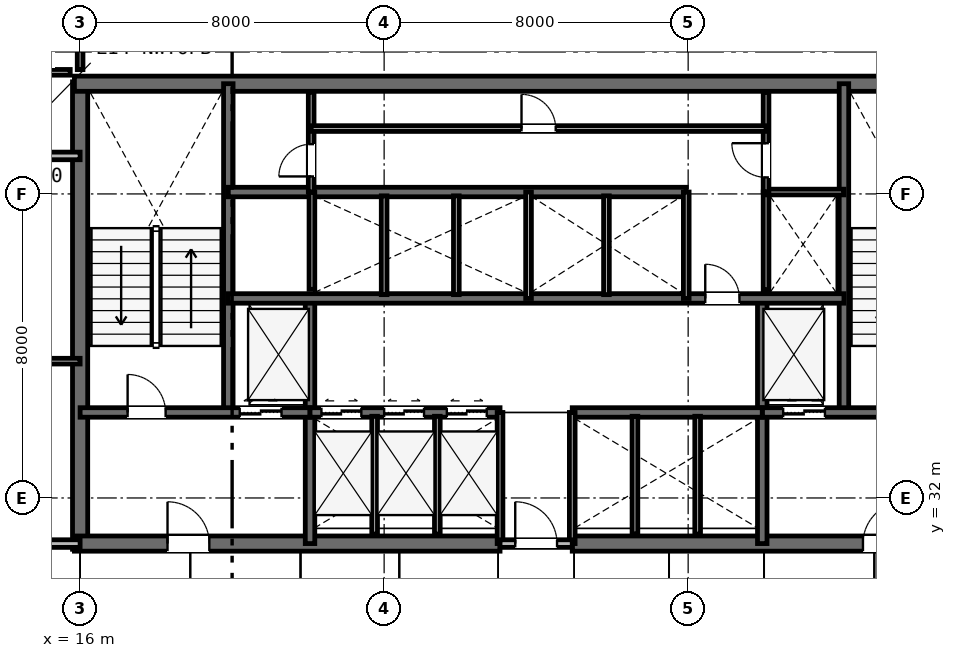
"""IFC4 building model, lengths in metres.
Left out: names, types, materials, properties, quantities, classifications, styles, units other than length and angle.
Written with IfcOpenShell. Run it as: python <this file> out.ifc"""

import sys

from ifc_helpers import new_model, si_unit, direction, frame, frame_2d, origin, place, context, subcontext, project, spatial, rectangle, extrude, element, fill, save


model = new_model("IFC4")
c1 = context("Model", 3, precision=1e-05, world=origin(), true_north=direction((0.0, 1.0)))
c2 = subcontext(c1, "Body", "Model", "MODEL_VIEW")
j1 = project(units=[si_unit("LENGTHUNIT", "METRE"), si_unit("PLANEANGLEUNIT", "RADIAN")], contexts=[c1])
p1 = place(None, origin())
s1 = spatial("IfcSite", under=j1, at=p1, CompositionType="ELEMENT")
p2 = place(p1, origin())
s2 = spatial("IfcBuilding", under=s1, at=p2, CompositionType="ELEMENT")
p3 = place(p2, frame((0.0, 0.0, 58.2)))
s3 = spatial("IfcBuildingStorey", under=s2, at=p3, CompositionType="ELEMENT", Elevation=58.2)
p4 = place(p3, frame((16.0, 30.65, 0.0), z_axis=(0.0, 0.0, 1.0), x_axis=(0.0, 1.0, 0.0)))
e1 = element("IfcWall", 1, at=p4, inside=s3, PredefinedType="SHEAR", context=c2, shape_type="SweptSolid", body=[
    extrude(rectangle(XDim=12.3, YDim=0.4, at=frame_2d((6.15, 0.0))), origin(), (0.0, 0.0, 1.0), 3.6),
])
p5 = place(p3, frame((15.85, 42.9, 0.0), z_axis=(0.0, 0.0, 1.0), x_axis=(1.0, 0.0, 0.0)))
e2 = element("IfcWall", 2, at=p5, inside=s3, PredefinedType="SHEAR", context=c2, shape_type="SweptSolid", body=[
    extrude(rectangle(XDim=24.3, YDim=0.4, at=frame_2d((12.15, 0.0))), origin(), (0.0, 0.0, 1.0), 3.6),
])
p6 = place(p3, frame((15.85, 30.8, 0.0), z_axis=(0.0, 0.0, 1.0), x_axis=(1.0, 0.0, 0.0)))
e3 = element("IfcWall", 3, at=p6, inside=s3, PredefinedType="SHEAR", context=c2, shape_type="SweptSolid", body=[
    extrude(rectangle(XDim=11.2, YDim=0.4, at=frame_2d((5.6, 0.0))), origin(), (0.0, 0.0, 1.0), 3.6),
])
p7 = place(p6, frame((2.45, 0.0, 0.0)))
e4 = element("IfcOpeningElement", 4, at=p7, cuts=e3, PredefinedType="OPENING", context=c2, shape_type="SweptSolid", body=[
    extrude(rectangle(XDim=1.1, YDim=2.15, at=frame_2d((0.55, 1.075))), frame((0.0, 0.21, 0.0), z_axis=(0.0, -1.0, 0.0), x_axis=(1.0, 0.0, 0.0)), (0.0, 0.0, 1.0), 0.42),
])
p8 = place(p3, frame((28.95, 30.8, 0.0), z_axis=(0.0, 0.0, 1.0), x_axis=(1.0, 0.0, 0.0)))
e5 = element("IfcWall", 5, at=p8, inside=s3, PredefinedType="SHEAR", context=c2, shape_type="SweptSolid", body=[
    extrude(rectangle(XDim=11.2, YDim=0.4, at=frame_2d((5.6, 0.0))), origin(), (0.0, 0.0, 1.0), 3.6),
])
p9 = place(p8, frame((7.65, 0.0, 0.0)))
e6 = element("IfcOpeningElement", 6, at=p9, cuts=e5, PredefinedType="OPENING", context=c2, shape_type="SweptSolid", body=[
    extrude(rectangle(XDim=1.1, YDim=2.15, at=frame_2d((0.55, 1.075))), frame((0.0, 0.21, 0.0), z_axis=(0.0, -1.0, 0.0), x_axis=(1.0, 0.0, 0.0)), (0.0, 0.0, 1.0), 0.42),
])
for number, where, z_axis, x_axis in (
    (7, (19.9, 34.25, 0.0), (0.0, 0.0, 1.0), (0.0, 1.0, 0.0)),
    (8, (36.1, 34.25, 0.0), (0.0, 0.0, 1.0), (0.0, 1.0, 0.0)),
):
    element("IfcWall", number, at=place(p3, frame(where, z_axis=z_axis, x_axis=x_axis)), inside=s3, PredefinedType="SHEAR", context=c2, shape_type="SweptSolid", body=[
        extrude(rectangle(XDim=8.65, YDim=0.25, at=frame_2d((4.325, 0.0))), origin(), (0.0, 0.0, 1.0), 3.6),
    ])
for number, where, z_axis, x_axis in (
    (9, (22.05, 30.8, 0.0), (0.0, 0.0, 1.0), (0.0, 1.0, 0.0)),
    (10, (33.95, 30.8, 0.0), (0.0, 0.0, 1.0), (0.0, 1.0, 0.0)),
):
    element("IfcWall", number, at=place(p3, frame(where, z_axis=z_axis, x_axis=x_axis)), inside=s3, PredefinedType="SHEAR", context=c2, shape_type="SweptSolid", body=[
        extrude(rectangle(XDim=6.45, YDim=0.25, at=frame_2d((3.225, 0.0))), origin(), (0.0, 0.0, 1.0), 3.6),
    ])
p10 = place(p3, frame((16.0, 34.25, 0.0), z_axis=(0.0, 0.0, 1.0), x_axis=(1.0, 0.0, 0.0)))
e11 = element("IfcWall", 11, at=p10, inside=s3, PredefinedType="SHEAR", context=c2, shape_type="SweptSolid", body=[
    extrude(rectangle(XDim=6.05, YDim=0.25, at=frame_2d((3.025, 0.0))), origin(), (0.0, 0.0, 1.0), 3.6),
])
p11 = place(p10, frame((1.25, 0.0, 0.0)))
e12 = element("IfcOpeningElement", 12, at=p11, cuts=e11, PredefinedType="OPENING", context=c2, shape_type="SweptSolid", body=[
    extrude(rectangle(XDim=1.0, YDim=2.15, at=frame_2d((0.5, 1.075))), frame((0.0, 0.135, 0.0), z_axis=(0.0, -1.0, 0.0), x_axis=(1.0, 0.0, 0.0)), (0.0, 0.0, 1.0), 0.27),
])
p12 = place(p10, frame((4.2, 0.0, 0.0)))
e13 = element("IfcOpeningElement", 13, at=p12, cuts=e11, PredefinedType="OPENING", context=c2, shape_type="SweptSolid", body=[
    extrude(rectangle(XDim=1.1, YDim=2.15, at=frame_2d((0.55, 1.075))), frame((0.0, 0.135, 0.0), z_axis=(0.0, -1.0, 0.0), x_axis=(1.0, 0.0, 0.0)), (0.0, 0.0, 1.0), 0.27),
])
p13 = place(p3, frame((33.95, 34.25, 0.0), z_axis=(0.0, 0.0, 1.0), x_axis=(1.0, 0.0, 0.0)))
e14 = element("IfcWall", 14, at=p13, inside=s3, PredefinedType="SHEAR", context=c2, shape_type="SweptSolid", body=[
    extrude(rectangle(XDim=6.05, YDim=0.25, at=frame_2d((3.025, 0.0))), origin(), (0.0, 0.0, 1.0), 3.6),
])
p14 = place(p13, frame((3.7, 0.0, 0.0)))
e15 = element("IfcOpeningElement", 15, at=p14, cuts=e14, PredefinedType="OPENING", context=c2, shape_type="SweptSolid", body=[
    extrude(rectangle(XDim=1.0, YDim=2.15, at=frame_2d((0.5, 1.075))), frame((0.0, 0.135, 0.0), z_axis=(0.0, -1.0, 0.0), x_axis=(1.0, 0.0, 0.0)), (0.0, 0.0, 1.0), 0.27),
])
p15 = place(p13, frame((0.55, 0.0, 0.0)))
e16 = element("IfcOpeningElement", 16, at=p15, cuts=e14, PredefinedType="OPENING", context=c2, shape_type="SweptSolid", body=[
    extrude(rectangle(XDim=1.1, YDim=2.15, at=frame_2d((0.55, 1.075))), frame((0.0, 0.135, 0.0), z_axis=(0.0, -1.0, 0.0), x_axis=(1.0, 0.0, 0.0)), (0.0, 0.0, 1.0), 0.27),
])
p16 = place(p3, frame((22.05, 34.25, 0.0), z_axis=(0.0, 0.0, 1.0), x_axis=(1.0, 0.0, 0.0)))
e17 = element("IfcWall", 17, at=p16, inside=s3, PredefinedType="SHEAR", context=c2, shape_type="SweptSolid", body=[
    extrude(rectangle(XDim=5.0, YDim=0.25, at=frame_2d((2.5, 0.0))), origin(), (0.0, 0.0, 1.0), 3.6),
])
p17 = place(p16, frame((0.3, 0.0, 0.0)))
e18 = element("IfcOpeningElement", 18, at=p17, cuts=e17, PredefinedType="OPENING", context=c2, shape_type="SweptSolid", body=[
    extrude(rectangle(XDim=1.05, YDim=2.15, at=frame_2d((0.525, 1.075))), frame((0.0, 0.135, 0.0), z_axis=(0.0, -1.0, 0.0), x_axis=(1.0, 0.0, 0.0)), (0.0, 0.0, 1.0), 0.27),
])
p18 = place(p16, frame((1.95, 0.0, 0.0)))
e19 = element("IfcOpeningElement", 19, at=p18, cuts=e17, PredefinedType="OPENING", context=c2, shape_type="SweptSolid", body=[
    extrude(rectangle(XDim=1.05, YDim=2.15, at=frame_2d((0.525, 1.075))), frame((0.0, 0.135, 0.0), z_axis=(0.0, -1.0, 0.0), x_axis=(1.0, 0.0, 0.0)), (0.0, 0.0, 1.0), 0.27),
])
p19 = place(p16, frame((3.6, 0.0, 0.0)))
e20 = element("IfcOpeningElement", 20, at=p19, cuts=e17, PredefinedType="OPENING", context=c2, shape_type="SweptSolid", body=[
    extrude(rectangle(XDim=1.05, YDim=2.15, at=frame_2d((0.525, 1.075))), frame((0.0, 0.135, 0.0), z_axis=(0.0, -1.0, 0.0), x_axis=(1.0, 0.0, 0.0)), (0.0, 0.0, 1.0), 0.27),
])
p20 = place(p3, frame((28.95, 34.25, 0.0), z_axis=(0.0, 0.0, 1.0), x_axis=(1.0, 0.0, 0.0)))
e21 = element("IfcWall", 21, at=p20, inside=s3, PredefinedType="SHEAR", context=c2, shape_type="SweptSolid", body=[
    extrude(rectangle(XDim=5.0, YDim=0.25, at=frame_2d((2.5, 0.0))), origin(), (0.0, 0.0, 1.0), 3.6),
])
p21 = place(p3, frame((19.9, 37.25, 0.0), z_axis=(0.0, 0.0, 1.0), x_axis=(1.0, 0.0, 0.0)))
e22 = element("IfcWall", 22, at=p21, inside=s3, PredefinedType="SHEAR", context=c2, shape_type="SweptSolid", body=[
    extrude(rectangle(XDim=16.2, YDim=0.25, at=frame_2d((8.1, 0.0))), origin(), (0.0, 0.0, 1.0), 3.6),
])
p22 = place(p21, frame((12.55, 0.0, 0.0)))
e23 = element("IfcOpeningElement", 23, at=p22, cuts=e22, PredefinedType="OPENING", context=c2, shape_type="SweptSolid", body=[
    extrude(rectangle(XDim=0.9, YDim=2.15, at=frame_2d((0.45, 1.075))), frame((0.0, 0.135, 0.0), z_axis=(0.0, -1.0, 0.0), x_axis=(1.0, 0.0, 0.0)), (0.0, 0.0, 1.0), 0.27),
])
p23 = place(p3, frame((19.9, 40.05, 0.0), z_axis=(0.0, 0.0, 1.0), x_axis=(1.0, 0.0, 0.0)))
e24 = element("IfcWall", 24, at=p23, inside=s3, PredefinedType="SHEAR", context=c2, shape_type="SweptSolid", body=[
    extrude(rectangle(XDim=12.05, YDim=0.25, at=frame_2d((6.025, 0.0))), origin(), (0.0, 0.0, 1.0), 3.6),
])
for number, where, z_axis, x_axis in (
    (25, (27.05, 30.8, 0.0), (0.0, 0.0, 1.0), (0.0, 1.0, 0.0)),
    (26, (28.95, 30.8, 0.0), (0.0, 0.0, 1.0), (0.0, 1.0, 0.0)),
):
    element("IfcWall", number, at=place(p3, frame(where, z_axis=z_axis, x_axis=x_axis)), inside=s3, PredefinedType="PLUMBINGWALL", context=c2, shape_type="SweptSolid", body=[
        extrude(rectangle(XDim=3.45, YDim=0.15, at=frame_2d((1.725, 0.0))), origin(), (0.0, 0.0, 1.0), 3.33),
    ])
p24 = place(p3, frame((27.05, 30.8, 0.0), z_axis=(0.0, 0.0, 1.0), x_axis=(1.0, 0.0, 0.0)))
e27 = element("IfcWall", 27, at=p24, inside=s3, PredefinedType="PARTITIONING", context=c2, shape_type="SweptSolid", body=[
    extrude(rectangle(XDim=1.9, YDim=0.2, at=frame_2d((0.95, 0.0))), origin(), (0.0, 0.0, 1.0), 3.33),
])
p25 = place(p24, frame((0.4, 0.0, 0.0)))
e28 = element("IfcOpeningElement", 28, at=p25, cuts=e27, PredefinedType="OPENING", context=c2, shape_type="SweptSolid", body=[
    extrude(rectangle(XDim=1.1, YDim=2.15, at=frame_2d((0.55, 1.075))), frame((0.0, 0.11, 0.0), z_axis=(0.0, -1.0, 0.0), x_axis=(1.0, 0.0, 0.0)), (0.0, 0.0, 1.0), 0.22),
])
for number, where, z_axis, x_axis in (
    (29, (23.75, 31.05, 0.0), (0.0, 0.0, 1.0), (0.0, 1.0, 0.0)),
    (30, (25.4, 31.05, 0.0), (0.0, 0.0, 1.0), (0.0, 1.0, 0.0)),
    (31, (30.6, 31.05, 0.0), (0.0, 0.0, 1.0), (0.0, 1.0, 0.0)),
    (32, (32.25, 31.05, 0.0), (0.0, 0.0, 1.0), (0.0, 1.0, 0.0)),
):
    element("IfcWall", number, at=place(p3, frame(where, z_axis=z_axis, x_axis=x_axis)), inside=s3, PredefinedType="PLUMBINGWALL", context=c2, shape_type="SweptSolid", body=[
        extrude(rectangle(XDim=3.1, YDim=0.15, at=frame_2d((1.55, 0.0))), origin(), (0.0, 0.0, 1.0), 3.33),
    ])
p26 = place(p3, frame((22.1, 37.49, 0.0), z_axis=(0.0, 0.0, 1.0), x_axis=(0.0, 1.0, 0.0)))
e33 = element("IfcWall", 33, at=p26, inside=s3, PredefinedType="PLUMBINGWALL", context=c2, shape_type="SweptSolid", body=[
    extrude(rectangle(XDim=2.56, YDim=0.15, at=frame_2d((1.28, 0.0))), origin(), (0.0, 0.0, 1.0), 3.33),
])
p27 = place(p3, frame((27.8, 37.25, 0.0), z_axis=(0.0, 0.0, 1.0), x_axis=(0.0, 1.0, 0.0)))
e34 = element("IfcWall", 34, at=p27, inside=s3, PredefinedType="PLUMBINGWALL", context=c2, shape_type="SweptSolid", body=[
    extrude(rectangle(XDim=2.8, YDim=0.15, at=frame_2d((1.4, 0.0))), origin(), (0.0, 0.0, 1.0), 3.33),
])
for number, where, z_axis, x_axis in (
    (35, (24.0, 37.35, 0.0), (0.0, 0.0, 1.0), (0.0, 1.0, 0.0)),
    (36, (25.9, 37.35, 0.0), (0.0, 0.0, 1.0), (0.0, 1.0, 0.0)),
):
    element("IfcWall", number, at=place(p3, frame(where, z_axis=z_axis, x_axis=x_axis)), inside=s3, PredefinedType="PLUMBINGWALL", context=c2, shape_type="SweptSolid", body=[
        extrude(rectangle(XDim=2.6, YDim=0.15, at=frame_2d((1.3, 0.0))), origin(), (0.0, 0.0, 1.0), 3.33),
    ])
p28 = place(p3, frame((31.95, 37.25, 0.0), z_axis=(0.0, 0.0, 1.0), x_axis=(0.0, 1.0, 0.0)))
e37 = element("IfcWall", 37, at=p28, inside=s3, PredefinedType="PLUMBINGWALL", context=c2, shape_type="SweptSolid", body=[
    extrude(rectangle(XDim=2.8, YDim=0.15, at=frame_2d((1.4, 0.0))), origin(), (0.0, 0.0, 1.0), 3.33),
])
p29 = place(p3, frame((29.85, 37.35, 0.0), z_axis=(0.0, 0.0, 1.0), x_axis=(0.0, 1.0, 0.0)))
e38 = element("IfcWall", 38, at=p29, inside=s3, PredefinedType="PLUMBINGWALL", context=c2, shape_type="SweptSolid", body=[
    extrude(rectangle(XDim=2.6, YDim=0.15, at=frame_2d((1.3, 0.0))), origin(), (0.0, 0.0, 1.0), 3.33),
])
p30 = place(p3, frame((34.05, 37.473, 0.0), z_axis=(0.0, 0.0, 1.0), x_axis=(0.0, 1.0, 0.0)))
e39 = element("IfcWall", 39, at=p30, inside=s3, PredefinedType="PLUMBINGWALL", context=c2, shape_type="SweptSolid", body=[
    extrude(rectangle(XDim=2.577, YDim=0.15, at=frame_2d((1.288, 0.0))), origin(), (0.0, 0.0, 1.0), 3.33),
])
p31 = place(p3, frame((34.05, 40.05, 0.0), z_axis=(0.0, 0.0, 1.0), x_axis=(1.0, 0.0, 0.0)))
e40 = element("IfcWall", 40, at=p31, inside=s3, PredefinedType="PARTITIONING", context=c2, shape_type="SweptSolid", body=[
    extrude(rectangle(XDim=2.05, YDim=0.15, at=frame_2d((1.025, 0.0))), origin(), (0.0, 0.0, 1.0), 3.33),
])
p32 = place(p3, frame((34.05, 40.05, 0.0), z_axis=(0.0, 0.0, 1.0), x_axis=(0.0, 1.0, 0.0)))
e41 = element("IfcWall", 41, at=p32, inside=s3, PredefinedType="PARTITIONING", context=c2, shape_type="SweptSolid", body=[
    extrude(rectangle(XDim=2.63, YDim=0.15, at=frame_2d((1.315, 0.0))), origin(), (0.0, 0.0, 1.0), 3.33),
])
p33 = place(p32, frame((0.385, 0.0, 0.0)))
e42 = element("IfcOpeningElement", 42, at=p33, cuts=e41, PredefinedType="OPENING", context=c2, shape_type="SweptSolid", body=[
    extrude(rectangle(XDim=0.9, YDim=2.15, at=frame_2d((0.45, 1.075))), frame((0.0, 0.085, 0.0), z_axis=(0.0, -1.0, 0.0), x_axis=(1.0, 0.0, 0.0)), (0.0, 0.0, 1.0), 0.17),
])
p34 = place(p3, frame((22.08, 40.05, 0.0), z_axis=(0.0, 0.0, 1.0), x_axis=(0.0, 1.0, 0.0)))
e43 = element("IfcWall", 43, at=p34, inside=s3, PredefinedType="PARTITIONING", context=c2, shape_type="SweptSolid", body=[
    extrude(rectangle(XDim=2.63, YDim=0.15, at=frame_2d((1.315, 0.0))), origin(), (0.0, 0.0, 1.0), 3.33),
])
p35 = place(p34, frame((0.41, 0.0, 0.0)))
e44 = element("IfcOpeningElement", 44, at=p35, cuts=e43, PredefinedType="OPENING", context=c2, shape_type="SweptSolid", body=[
    extrude(rectangle(XDim=0.85, YDim=2.15, at=frame_2d((0.425, 1.075))), frame((0.0, 0.085, 0.0), z_axis=(0.0, -1.0, 0.0), x_axis=(1.0, 0.0, 0.0)), (0.0, 0.0, 1.0), 0.17),
])
p36 = place(p3, frame((22.08, 41.72, 0.0), z_axis=(0.0, 0.0, 1.0), x_axis=(1.0, 0.0, 0.0)))
e45 = element("IfcWall", 45, at=p36, inside=s3, PredefinedType="PARTITIONING", context=c2, shape_type="SweptSolid", body=[
    extrude(rectangle(XDim=11.97, YDim=0.15, at=frame_2d((5.985, 0.0))), origin(), (0.0, 0.0, 1.0), 3.33),
])
p37 = place(p36, frame((5.535, 0.0, 0.0)))
e46 = element("IfcOpeningElement", 46, at=p37, cuts=e45, PredefinedType="OPENING", context=c2, shape_type="SweptSolid", body=[
    extrude(rectangle(XDim=0.9, YDim=2.15, at=frame_2d((0.45, 1.075))), frame((0.0, 0.085, 0.0), z_axis=(0.0, -1.0, 0.0), x_axis=(1.0, 0.0, 0.0)), (0.0, 0.0, 1.0), 0.17),
])
p38 = place(p3, frame((8.3, 35.6, 0.0), z_axis=(0.0, 0.0, 1.0), x_axis=(1.0, 0.0, 0.0)))
e47 = element("IfcWall", 47, at=p38, inside=s3, PredefinedType="PARTITIONING", context=c2, shape_type="SweptSolid", body=[
    extrude(rectangle(XDim=7.7, YDim=0.15, at=frame_2d((3.85, 0.0))), origin(), (0.0, 0.0, 1.0), 2.82),
])
p39 = place(p3, frame((8.3, 30.8, 0.0), z_axis=(0.0, 0.0, 1.0), x_axis=(1.0, 0.0, 0.0)))
e48 = element("IfcWall", 48, at=p39, inside=s3, PredefinedType="PARTITIONING", context=c2, shape_type="SweptSolid", body=[
    extrude(rectangle(XDim=7.7, YDim=0.2, at=frame_2d((3.85, 0.0))), origin(), (0.0, 0.0, 1.0), 2.82),
])
p40 = place(p39, frame((5.325, 0.0, 0.0)))
e49 = element("IfcOpeningElement", 49, at=p40, cuts=e48, PredefinedType="OPENING", context=c2, shape_type="SweptSolid", body=[
    extrude(rectangle(XDim=0.95, YDim=2.15, at=frame_2d((0.475, 1.075))), frame((0.0, 0.11, 0.0), z_axis=(0.0, -1.0, 0.0), x_axis=(1.0, 0.0, 0.0)), (0.0, 0.0, 1.0), 0.22),
])
p41 = place(p3, frame((0.1, 41.0, 0.0), z_axis=(0.0, 0.0, 1.0), x_axis=(1.0, 0.0, 0.0)))
e50 = element("IfcWall", 50, at=p41, inside=s3, PredefinedType="PARTITIONING", context=c2, shape_type="SweptSolid", body=[
    extrude(rectangle(XDim=15.9, YDim=0.2, at=frame_2d((7.95, 0.0))), origin(), (0.0, 0.0, 1.0), 2.82),
])
p42 = place(p41, frame((6.779, 0.0, 0.0)))
e51 = element("IfcOpeningElement", 51, at=p42, cuts=e50, PredefinedType="OPENING", context=c2, shape_type="SweptSolid", body=[
    extrude(rectangle(XDim=0.95, YDim=2.15, at=frame_2d((0.475, 1.075))), frame((0.0, 0.11, 0.0), z_axis=(0.0, -1.0, 0.0), x_axis=(1.0, 0.0, 0.0)), (0.0, 0.0, 1.0), 0.22),
])
p43 = place(p3, frame((13.55, 43.2, 0.0), z_axis=(0.0, 0.0, 1.0), x_axis=(1.0, 0.0, 0.0)))
e52 = element("IfcWall", 52, at=p43, inside=s3, PredefinedType="PARTITIONING", context=c2, shape_type="SweptSolid", body=[
    extrude(rectangle(XDim=2.19, YDim=0.15, at=frame_2d((1.095, 0.0))), origin(), (0.0, 0.0, 1.0), 3.33),
])
p44 = place(p3, frame((16.0, 43.27, 0.0), z_axis=(0.0, 0.0, 1.0), x_axis=(0.0, 1.0, 0.0)))
e53 = element("IfcWall", 53, at=p44, inside=s3, PredefinedType="PARTITIONING", context=c2, shape_type="SweptSolid", body=[
    extrude(rectangle(XDim=4.63, YDim=0.15, at=frame_2d((2.315, 0.0))), origin(), (0.0, 0.0, 1.0), 2.93),
])
p45 = place(p25, origin())
e54 = element("IfcDoor", 54, at=p45, inside=s3, OperationType="SINGLE_SWING_LEFT", PredefinedType="DOOR", context=c2, shape_type="SweptSolid", body=[
    extrude(rectangle(XDim=1.1, YDim=2.15, at=frame_2d((0.55, 1.075))), frame((0.0, 0.025, 0.0), z_axis=(0.0, -1.0, 0.0), x_axis=(1.0, 0.0, 0.0)), (0.0, 0.0, 1.0), 0.05),
])
fill(e28, e54)
p46 = place(p11, origin())
e55 = element("IfcDoor", 55, at=p46, inside=s3, OperationType="SINGLE_SWING_LEFT", PredefinedType="DOOR", context=c2, shape_type="SweptSolid", body=[
    extrude(rectangle(XDim=1.0, YDim=2.15, at=frame_2d((0.5, 1.075))), frame((0.0, 0.025, 0.0), z_axis=(0.0, -1.0, 0.0), x_axis=(1.0, 0.0, 0.0)), (0.0, 0.0, 1.0), 0.05),
])
fill(e12, e55)
p47 = place(p7, origin())
e56 = element("IfcDoor", 56, at=p47, inside=s3, OperationType="SINGLE_SWING_LEFT", PredefinedType="DOOR", context=c2, shape_type="SweptSolid", body=[
    extrude(rectangle(XDim=1.1, YDim=2.15, at=frame_2d((0.55, 1.075))), frame((0.0, 0.025, 0.0), z_axis=(0.0, -1.0, 0.0), x_axis=(1.0, 0.0, 0.0)), (0.0, 0.0, 1.0), 0.05),
])
fill(e4, e56)
p48 = place(p9, origin())
e57 = element("IfcDoor", 57, at=p48, inside=s3, OperationType="SINGLE_SWING_RIGHT", PredefinedType="DOOR", context=c2, shape_type="SweptSolid", body=[
    extrude(rectangle(XDim=1.1, YDim=2.15, at=frame_2d((0.55, 1.075))), frame((0.0, 0.025, 0.0), z_axis=(0.0, -1.0, 0.0), x_axis=(1.0, 0.0, 0.0)), (0.0, 0.0, 1.0), 0.05),
])
fill(e6, e57)
p49 = place(p22, origin())
e58 = element("IfcDoor", 58, at=p49, inside=s3, OperationType="SINGLE_SWING_LEFT", PredefinedType="DOOR", context=c2, shape_type="SweptSolid", body=[
    extrude(rectangle(XDim=0.9, YDim=2.15, at=frame_2d((0.45, 1.075))), frame((0.0, 0.025, 0.0), z_axis=(0.0, -1.0, 0.0), x_axis=(1.0, 0.0, 0.0)), (0.0, 0.0, 1.0), 0.05),
])
fill(e23, e58)
p50 = place(p33, origin())
e59 = element("IfcDoor", 59, at=p50, inside=s3, OperationType="SINGLE_SWING_RIGHT", PredefinedType="DOOR", context=c2, shape_type="SweptSolid", body=[
    extrude(rectangle(XDim=0.9, YDim=2.15, at=frame_2d((0.45, 1.075))), frame((0.0, 0.025, 0.0), z_axis=(0.0, -1.0, 0.0), x_axis=(1.0, 0.0, 0.0)), (0.0, 0.0, 1.0), 0.05),
])
fill(e42, e59)
p51 = place(p35, origin())
e60 = element("IfcDoor", 60, at=p51, inside=s3, OperationType="SINGLE_SWING_LEFT", PredefinedType="DOOR", context=c2, shape_type="SweptSolid", body=[
    extrude(rectangle(XDim=0.85, YDim=2.15, at=frame_2d((0.425, 1.075))), frame((0.0, 0.025, 0.0), z_axis=(0.0, -1.0, 0.0), x_axis=(1.0, 0.0, 0.0)), (0.0, 0.0, 1.0), 0.05),
])
fill(e44, e60)
p52 = place(p37, origin())
e61 = element("IfcDoor", 61, at=p52, inside=s3, OperationType="SINGLE_SWING_LEFT", PredefinedType="DOOR", context=c2, shape_type="SweptSolid", body=[
    extrude(rectangle(XDim=0.9, YDim=2.15, at=frame_2d((0.45, 1.075))), frame((0.0, 0.025, 0.0), z_axis=(0.0, -1.0, 0.0), x_axis=(1.0, 0.0, 0.0)), (0.0, 0.0, 1.0), 0.05),
])
fill(e46, e61)
p53 = place(p12, origin())
e62 = element("IfcDoor", 62, at=p53, inside=s3, OperationType="DOUBLE_DOOR_SLIDING", PredefinedType="DOOR", context=c2, shape_type="SweptSolid", body=[
    extrude(rectangle(XDim=1.1, YDim=2.15, at=frame_2d((0.55, 1.075))), frame((0.0, 0.025, 0.0), z_axis=(0.0, -1.0, 0.0), x_axis=(1.0, 0.0, 0.0)), (0.0, 0.0, 1.0), 0.05),
])
fill(e13, e62)
p54 = place(p15, origin())
e63 = element("IfcDoor", 63, at=p54, inside=s3, OperationType="DOUBLE_DOOR_SLIDING", PredefinedType="DOOR", context=c2, shape_type="SweptSolid", body=[
    extrude(rectangle(XDim=1.1, YDim=2.15, at=frame_2d((0.55, 1.075))), frame((0.0, 0.025, 0.0), z_axis=(0.0, -1.0, 0.0), x_axis=(1.0, 0.0, 0.0)), (0.0, 0.0, 1.0), 0.05),
])
fill(e16, e63)
p55 = place(p17, origin())
e64 = element("IfcDoor", 64, at=p55, inside=s3, OperationType="DOUBLE_DOOR_SLIDING", PredefinedType="DOOR", context=c2, shape_type="SweptSolid", body=[
    extrude(rectangle(XDim=1.05, YDim=2.15, at=frame_2d((0.525, 1.075))), frame((0.0, 0.025, 0.0), z_axis=(0.0, -1.0, 0.0), x_axis=(1.0, 0.0, 0.0)), (0.0, 0.0, 1.0), 0.05),
])
fill(e18, e64)
p56 = place(p18, origin())
e65 = element("IfcDoor", 65, at=p56, inside=s3, OperationType="DOUBLE_DOOR_SLIDING", PredefinedType="DOOR", context=c2, shape_type="SweptSolid", body=[
    extrude(rectangle(XDim=1.05, YDim=2.15, at=frame_2d((0.525, 1.075))), frame((0.0, 0.025, 0.0), z_axis=(0.0, -1.0, 0.0), x_axis=(1.0, 0.0, 0.0)), (0.0, 0.0, 1.0), 0.05),
])
fill(e19, e65)
p57 = place(p19, origin())
e66 = element("IfcDoor", 66, at=p57, inside=s3, OperationType="DOUBLE_DOOR_SLIDING", PredefinedType="DOOR", context=c2, shape_type="SweptSolid", body=[
    extrude(rectangle(XDim=1.05, YDim=2.15, at=frame_2d((0.525, 1.075))), frame((0.0, 0.025, 0.0), z_axis=(0.0, -1.0, 0.0), x_axis=(1.0, 0.0, 0.0)), (0.0, 0.0, 1.0), 0.05),
])
fill(e20, e66)
save(model, sys.argv[1])
